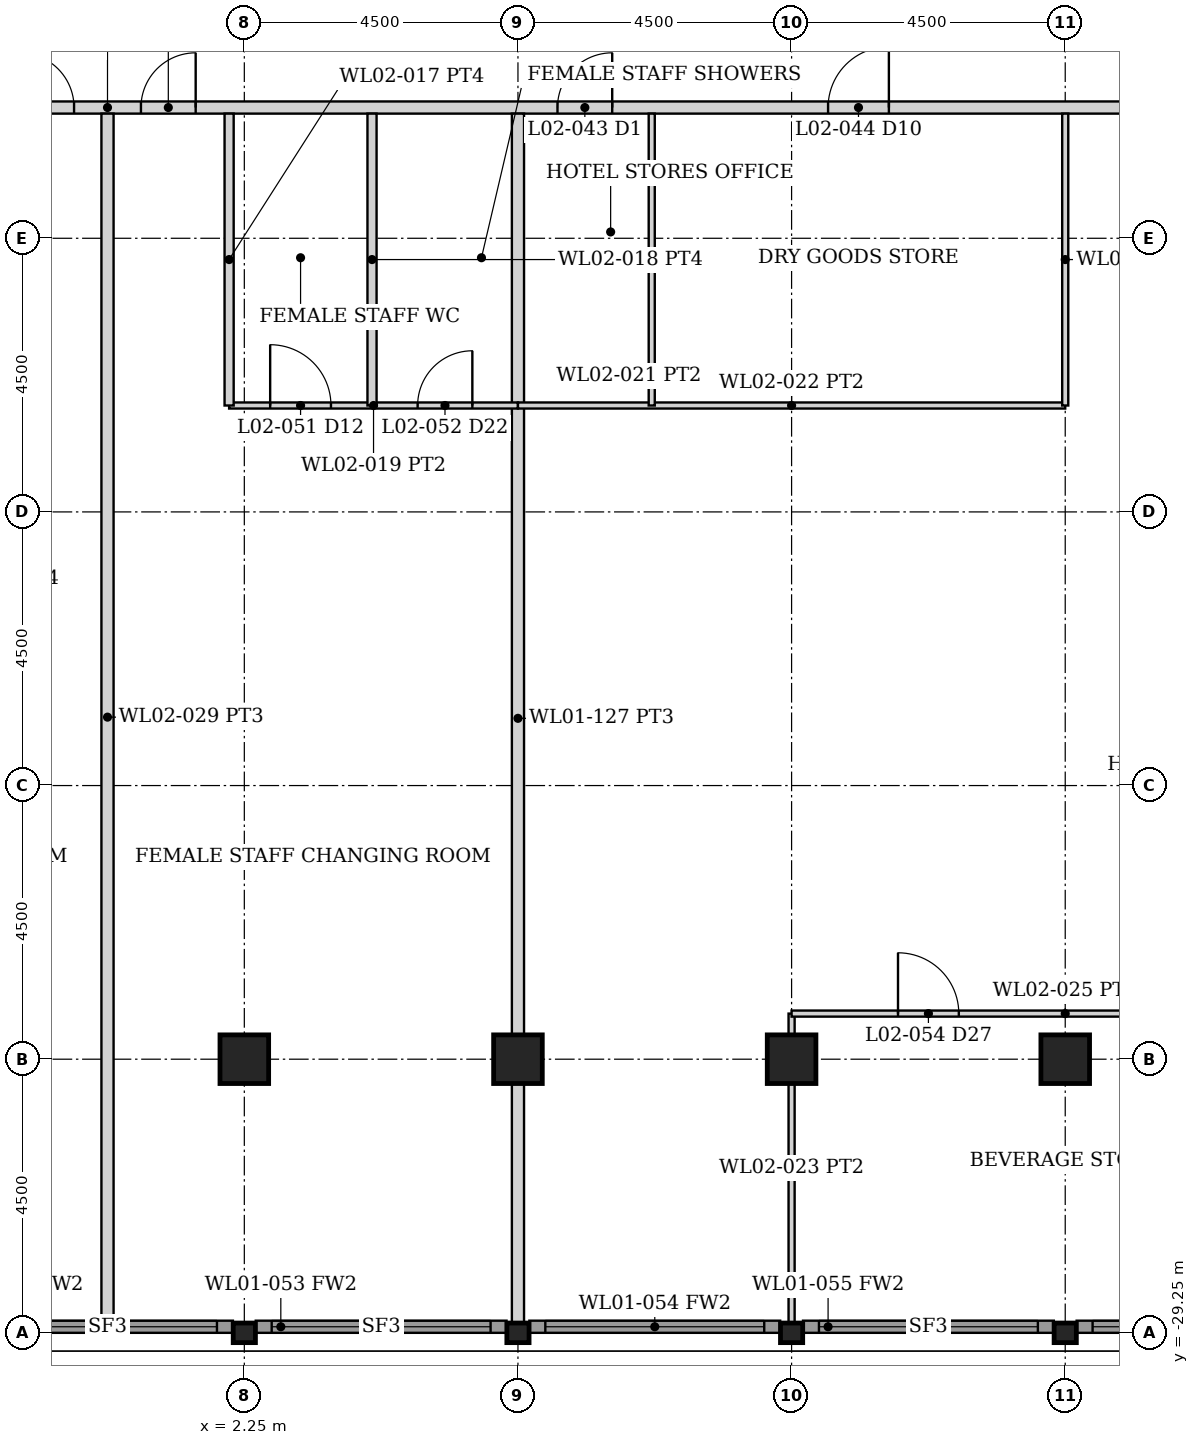
"""IFC4 building model, lengths in metres.
Left out: names, types, materials, properties, quantities, classifications, styles, units other than length and angle.
Written with IfcOpenShell. Run it as: python <this file> out.ifc"""

import sys

from ifc_helpers import new_model, si_unit, direction, frame, frame_2d, origin, origin_2d, place, context, subcontext, project, spatial, rectangle, hollow_rectangle, i_section, extrude, element, fill, save


model = new_model("IFC4")
c1 = context("Model", 3, precision=1e-05, world=origin(), true_north=direction((0.0, 1.0)))
c2 = subcontext(c1, "Body", "Model", "MODEL_VIEW")
j1 = project(units=[si_unit("LENGTHUNIT", "METRE"), si_unit("PLANEANGLEUNIT", "RADIAN")], contexts=[c1])
p1 = place(None, origin())
s1 = spatial("IfcSite", under=j1, at=p1, CompositionType="ELEMENT")
p2 = place(p1, origin())
s2 = spatial("IfcBuilding", under=s1, at=p2, CompositionType="ELEMENT")
p3 = place(p2, frame((0.0, 0.0, 11.0)))
s3 = spatial("IfcBuildingStorey", under=s2, at=p3, CompositionType="ELEMENT", Elevation=11.0)
for number, where, z_axis, x_axis in (
    (1, (2.25, -24.75, 0.0), (0.0, 0.0, 1.0), (0.0, 1.0, 0.0)),
    (2, (6.75, -24.75, 0.0), (0.0, 0.0, 1.0), (0.0, 1.0, 0.0)),
    (3, (11.25, -24.75, 0.0), (0.0, 0.0, 1.0), (0.0, 1.0, 0.0)),
    (4, (15.75, -24.75, 0.0), (0.0, 0.0, 1.0), (0.0, 1.0, 0.0)),
):
    element("IfcColumn", number, at=place(p3, frame(where, z_axis=z_axis, x_axis=x_axis)), inside=s3, PredefinedType="COLUMN", context=c2, shape_type="SweptSolid", body=[
        extrude(hollow_rectangle(XDim=0.8, YDim=0.8, WallThickness=0.08, at=origin_2d()), origin(), (0.0, 0.0, 1.0), 5.0),
    ])
for number, where, z_axis, x_axis in (
    (5, (2.25, -29.25, 0.0), (0.0, 0.0, 1.0), (0.0, 1.0, 0.0)),
    (6, (6.75, -29.25, 0.0), (0.0, 0.0, 1.0), (0.0, 1.0, 0.0)),
    (7, (11.25, -29.25, 0.0), (0.0, 0.0, 1.0), (0.0, 1.0, 0.0)),
    (8, (15.75, -29.25, 0.0), (0.0, 0.0, 1.0), (0.0, 1.0, 0.0)),
):
    element("IfcColumn", number, at=place(p3, frame(where, z_axis=z_axis, x_axis=x_axis)), inside=s3, PredefinedType="COLUMN", context=c2, shape_type="SweptSolid", body=[
        extrude(i_section(OverallWidth=0.322, OverallDepth=0.365, WebThickness=0.027, FlangeThickness=0.044, FilletRadius=0.015, at=origin_2d()), origin(), (0.0, 0.0, 1.0), 5.0),
    ])
p4 = place(p3, frame((-2.062, -29.15, 0.0), z_axis=(0.0, 0.0, 1.0), x_axis=(1.0, 0.0, 0.0)))
e9 = element("IfcWall", 9, at=p4, inside=s3, PredefinedType="SOLIDWALL", context=c2, shape_type="SweptSolid", body=[
    extrude(rectangle(XDim=4.125, YDim=0.2, at=frame_2d((2.062, 0.0))), origin(), (0.0, 0.0, 1.0), 4.133),
])
p5 = place(p4, frame((0.262, 0.0, 0.15)))
e10 = element("IfcOpeningElement", 10, at=p5, cuts=e9, PredefinedType="OPENING", context=c2, shape_type="SweptSolid", body=[
    extrude(rectangle(XDim=3.6, YDim=3.833, at=frame_2d((1.8, 1.917))), frame((0.0, 0.11, 0.0), z_axis=(0.0, -1.0, 0.0), x_axis=(1.0, 0.0, 0.0)), (0.0, 0.0, 1.0), 0.22),
])
p6 = place(p3, frame((2.438, -29.15, 0.0), z_axis=(0.0, 0.0, 1.0), x_axis=(1.0, 0.0, 0.0)))
e11 = element("IfcWall", 11, at=p6, inside=s3, PredefinedType="SOLIDWALL", context=c2, shape_type="SweptSolid", body=[
    extrude(rectangle(XDim=4.125, YDim=0.2, at=frame_2d((2.062, 0.0))), origin(), (0.0, 0.0, 1.0), 4.133),
])
p7 = place(p6, frame((0.262, 0.0, 0.15)))
e12 = element("IfcOpeningElement", 12, at=p7, cuts=e11, PredefinedType="OPENING", context=c2, shape_type="SweptSolid", body=[
    extrude(rectangle(XDim=3.6, YDim=3.833, at=frame_2d((1.8, 1.917))), frame((0.0, 0.11, 0.0), z_axis=(0.0, -1.0, 0.0), x_axis=(1.0, 0.0, 0.0)), (0.0, 0.0, 1.0), 0.22),
])
p8 = place(p3, frame((6.938, -29.15, 0.0), z_axis=(0.0, 0.0, 1.0), x_axis=(1.0, 0.0, 0.0)))
e13 = element("IfcWall", 13, at=p8, inside=s3, PredefinedType="SOLIDWALL", context=c2, shape_type="SweptSolid", body=[
    extrude(rectangle(XDim=4.125, YDim=0.2, at=frame_2d((2.062, 0.0))), origin(), (0.0, 0.0, 1.0), 4.133),
])
p9 = place(p8, frame((0.262, 0.0, 0.15)))
e14 = element("IfcOpeningElement", 14, at=p9, cuts=e13, PredefinedType="OPENING", context=c2, shape_type="SweptSolid", body=[
    extrude(rectangle(XDim=3.6, YDim=3.833, at=frame_2d((1.8, 1.917))), frame((0.0, 0.11, 0.0), z_axis=(0.0, -1.0, 0.0), x_axis=(1.0, 0.0, 0.0)), (0.0, 0.0, 1.0), 0.22),
])
p10 = place(p3, frame((11.438, -29.15, 0.0), z_axis=(0.0, 0.0, 1.0), x_axis=(1.0, 0.0, 0.0)))
e15 = element("IfcWall", 15, at=p10, inside=s3, PredefinedType="SOLIDWALL", context=c2, shape_type="SweptSolid", body=[
    extrude(rectangle(XDim=4.125, YDim=0.2, at=frame_2d((2.062, 0.0))), origin(), (0.0, 0.0, 1.0), 4.133),
])
p11 = place(p10, frame((0.262, 0.0, 0.15)))
e16 = element("IfcOpeningElement", 16, at=p11, cuts=e15, PredefinedType="OPENING", context=c2, shape_type="SweptSolid", body=[
    extrude(rectangle(XDim=3.6, YDim=3.833, at=frame_2d((1.8, 1.917))), frame((0.0, 0.11, 0.0), z_axis=(0.0, -1.0, 0.0), x_axis=(1.0, 0.0, 0.0)), (0.0, 0.0, 1.0), 0.22),
])
p12 = place(p3, frame((15.938, -29.15, 0.0), z_axis=(0.0, 0.0, 1.0), x_axis=(1.0, 0.0, 0.0)))
e17 = element("IfcWall", 17, at=p12, inside=s3, PredefinedType="SOLIDWALL", context=c2, shape_type="SweptSolid", body=[
    extrude(rectangle(XDim=4.125, YDim=0.2, at=frame_2d((2.062, 0.0))), origin(), (0.0, 0.0, 1.0), 4.133),
])
p13 = place(p12, frame((0.262, 0.0, 0.15)))
e18 = element("IfcOpeningElement", 18, at=p13, cuts=e17, PredefinedType="OPENING", context=c2, shape_type="SweptSolid", body=[
    extrude(rectangle(XDim=3.6, YDim=3.833, at=frame_2d((1.8, 1.917))), frame((0.0, 0.11, 0.0), z_axis=(0.0, -1.0, 0.0), x_axis=(1.0, 0.0, 0.0)), (0.0, 0.0, 1.0), 0.22),
])
p14 = place(p3, frame((-25.075, -9.1, 0.0), z_axis=(0.0, 0.0, 1.0), x_axis=(1.0, 0.0, 0.0)))
e19 = element("IfcWall", 19, at=p14, inside=s3, PredefinedType="PARTITIONING", context=c2, shape_type="SweptSolid", body=[
    extrude(rectangle(XDim=50.15, YDim=0.2, at=frame_2d((25.075, 0.0))), origin(), (0.0, 0.0, 1.0), 3.829),
])
p15 = place(p14, frame((6.85, 0.0, 0.0)))
e20 = element("IfcOpeningElement", 20, at=p15, cuts=e19, PredefinedType="OPENING", context=c2, shape_type="SweptSolid", body=[
    extrude(rectangle(XDim=0.9, YDim=2.1, at=frame_2d((0.45, 1.05))), frame((0.0, 0.11, 0.0), z_axis=(0.0, -1.0, 0.0), x_axis=(1.0, 0.0, 0.0)), (0.0, 0.0, 1.0), 0.22),
])
p16 = place(p14, frame((23.625, 0.0, 0.0)))
e21 = element("IfcOpeningElement", 21, at=p16, cuts=e19, PredefinedType="OPENING", context=c2, shape_type="SweptSolid", body=[
    extrude(rectangle(XDim=0.9, YDim=2.1, at=frame_2d((0.45, 1.05))), frame((0.0, 0.11, 0.0), z_axis=(0.0, -1.0, 0.0), x_axis=(1.0, 0.0, 0.0)), (0.0, 0.0, 1.0), 0.22),
])
p17 = place(p14, frame((25.625, 0.0, 0.0)))
e22 = element("IfcOpeningElement", 22, at=p17, cuts=e19, PredefinedType="OPENING", context=c2, shape_type="SweptSolid", body=[
    extrude(rectangle(XDim=0.9, YDim=2.1, at=frame_2d((0.45, 1.05))), frame((0.0, 0.11, 0.0), z_axis=(0.0, -1.0, 0.0), x_axis=(1.0, 0.0, 0.0)), (0.0, 0.0, 1.0), 0.22),
])
p18 = place(p14, frame((32.475, 0.0, 0.0)))
e23 = element("IfcOpeningElement", 23, at=p18, cuts=e19, PredefinedType="OPENING", context=c2, shape_type="SweptSolid", body=[
    extrude(rectangle(XDim=0.9, YDim=2.1, at=frame_2d((0.45, 1.05))), frame((0.0, 0.11, 0.0), z_axis=(0.0, -1.0, 0.0), x_axis=(1.0, 0.0, 0.0)), (0.0, 0.0, 1.0), 0.22),
])
p19 = place(p14, frame((36.925, 0.0, 0.0)))
e24 = element("IfcOpeningElement", 24, at=p19, cuts=e19, PredefinedType="OPENING", context=c2, shape_type="SweptSolid", body=[
    extrude(rectangle(XDim=1.0, YDim=2.1, at=frame_2d((0.5, 1.05))), frame((0.0, 0.11, 0.0), z_axis=(0.0, -1.0, 0.0), x_axis=(1.0, 0.0, 0.0)), (0.0, 0.0, 1.0), 0.22),
])
p20 = place(p14, frame((42.4, 0.0, 0.0)))
e25 = element("IfcOpeningElement", 25, at=p20, cuts=e19, PredefinedType="OPENING", context=c2, shape_type="SweptSolid", body=[
    extrude(rectangle(XDim=0.9, YDim=2.1, at=frame_2d((0.45, 1.05))), frame((0.0, 0.11, 0.0), z_axis=(0.0, -1.0, 0.0), x_axis=(1.0, 0.0, 0.0)), (0.0, 0.0, 1.0), 0.22),
])
p21 = place(p3, frame((0.0, -29.05, 0.0), z_axis=(0.0, 0.0, 1.0), x_axis=(0.0, 1.0, 0.0)))
e26 = element("IfcWall", 26, at=p21, inside=s3, PredefinedType="PARTITIONING", context=c2, shape_type="SweptSolid", body=[
    extrude(rectangle(XDim=19.85, YDim=0.2, at=frame_2d((9.925, 0.0))), origin(), (0.0, 0.0, 1.0), 3.829),
])
p22 = place(p3, frame((6.75, -29.089, 0.0), z_axis=(0.0, 0.0, 1.0), x_axis=(0.0, 1.0, 0.0)))
e27 = element("IfcWall", 27, at=p22, inside=s3, PredefinedType="PARTITIONING", context=c2, shape_type="SweptSolid", body=[
    extrude(rectangle(XDim=19.889, YDim=0.2, at=frame_2d((9.944, 0.0))), origin(), (0.0, 0.0, 1.0), 3.829),
])
p23 = place(p3, frame((2.0, -14.0, 0.0), z_axis=(0.0, 0.0, 1.0), x_axis=(1.0, 0.0, 0.0)))
e28 = element("IfcWall", 28, at=p23, inside=s3, PredefinedType="PARTITIONING", context=c2, shape_type="SweptSolid", body=[
    extrude(rectangle(XDim=4.75, YDim=0.1, at=frame_2d((2.375, 0.0))), origin(), (0.0, 0.0, 1.0), 3.829),
])
p24 = place(p23, frame((3.1, 0.0, 0.0)))
e29 = element("IfcOpeningElement", 29, at=p24, cuts=e28, PredefinedType="OPENING", context=c2, shape_type="SweptSolid", body=[
    extrude(rectangle(XDim=0.9, YDim=2.1, at=frame_2d((0.45, 1.05))), frame((0.0, 0.06, 0.0), z_axis=(0.0, -1.0, 0.0), x_axis=(1.0, 0.0, 0.0)), (0.0, 0.0, 1.0), 0.12),
])
p25 = place(p23, frame((0.675, 0.0, 0.0)))
e30 = element("IfcOpeningElement", 30, at=p25, cuts=e28, PredefinedType="OPENING", context=c2, shape_type="SweptSolid", body=[
    extrude(rectangle(XDim=1.0, YDim=2.1, at=frame_2d((0.5, 1.05))), frame((0.0, 0.06, 0.0), z_axis=(0.0, -1.0, 0.0), x_axis=(1.0, 0.0, 0.0)), (0.0, 0.0, 1.0), 0.12),
])
for number, where, z_axis, x_axis in (
    (31, (2.0, -14.0, 0.0), (0.0, 0.0, 1.0), (0.0, 1.0, 0.0)),
    (32, (4.35, -14.0, 0.0), (0.0, 0.0, 1.0), (0.0, 1.0, 0.0)),
):
    element("IfcWall", number, at=place(p3, frame(where, z_axis=z_axis, x_axis=x_axis)), inside=s3, PredefinedType="PARTITIONING", context=c2, shape_type="SweptSolid", body=[
        extrude(rectangle(XDim=4.8, YDim=0.15, at=frame_2d((2.4, 0.0))), origin(), (0.0, 0.0, 1.0), 3.829),
    ])
p26 = place(p3, frame((6.75, -14.0, 0.0), z_axis=(0.0, 0.0, 1.0), x_axis=(1.0, 0.0, 0.0)))
e33 = element("IfcWall", 33, at=p26, inside=s3, PredefinedType="PARTITIONING", context=c2, shape_type="SweptSolid", body=[
    extrude(rectangle(XDim=9.0, YDim=0.1, at=frame_2d((4.5, 0.0))), origin(), (0.0, 0.0, 1.0), 3.829),
])
for number, where, z_axis, x_axis in (
    (34, (8.95, -14.0, 0.0), (0.0, 0.0, 1.0), (0.0, 1.0, 0.0)),
    (35, (15.75, -14.0, 0.0), (0.0, 0.0, 1.0), (0.0, 1.0, 0.0)),
):
    element("IfcWall", number, at=place(p3, frame(where, z_axis=z_axis, x_axis=x_axis)), inside=s3, PredefinedType="PARTITIONING", context=c2, shape_type="SweptSolid", body=[
        extrude(rectangle(XDim=4.8, YDim=0.1, at=frame_2d((2.4, 0.0))), origin(), (0.0, 0.0, 1.0), 3.829),
    ])
p27 = place(p3, frame((11.25, -29.089, 0.0), z_axis=(0.0, 0.0, 1.0), x_axis=(0.0, 1.0, 0.0)))
e36 = element("IfcWall", 36, at=p27, inside=s3, PredefinedType="PARTITIONING", context=c2, shape_type="SweptSolid", body=[
    extrude(rectangle(XDim=5.089, YDim=0.1, at=frame_2d((2.544, 0.0))), origin(), (0.0, 0.0, 1.0), 3.829),
])
p28 = place(p3, frame((11.25, -24.0, 0.0), z_axis=(0.0, 0.0, 1.0), x_axis=(1.0, 0.0, 0.0)))
e37 = element("IfcWall", 37, at=p28, inside=s3, PredefinedType="PARTITIONING", context=c2, shape_type="SweptSolid", body=[
    extrude(rectangle(XDim=9.0, YDim=0.1, at=frame_2d((4.5, 0.0))), origin(), (0.0, 0.0, 1.0), 3.829),
])
p29 = place(p28, frame((1.75, 0.0, 0.0)))
e38 = element("IfcOpeningElement", 38, at=p29, cuts=e37, PredefinedType="OPENING", context=c2, shape_type="SweptSolid", body=[
    extrude(rectangle(XDim=1.0, YDim=2.1, at=frame_2d((0.5, 1.05))), frame((0.0, 0.06, 0.0), z_axis=(0.0, -1.0, 0.0), x_axis=(1.0, 0.0, 0.0)), (0.0, 0.0, 1.0), 0.12),
])
p30 = place(p5, origin())
e39 = element("IfcWindow", 39, at=p30, inside=s3, PartitioningType="SINGLE_PANEL", PredefinedType="WINDOW", context=c2, shape_type="SweptSolid", body=[
    extrude(rectangle(XDim=3.6, YDim=3.833, at=frame_2d((1.8, 1.917))), frame((0.0, 0.03, 0.0), z_axis=(0.0, -1.0, 0.0), x_axis=(1.0, 0.0, 0.0)), (0.0, 0.0, 1.0), 0.06),
])
fill(e10, e39)
p31 = place(p7, origin())
e40 = element("IfcWindow", 40, at=p31, inside=s3, PartitioningType="SINGLE_PANEL", PredefinedType="WINDOW", context=c2, shape_type="SweptSolid", body=[
    extrude(rectangle(XDim=3.6, YDim=3.833, at=frame_2d((1.8, 1.917))), frame((0.0, 0.03, 0.0), z_axis=(0.0, -1.0, 0.0), x_axis=(1.0, 0.0, 0.0)), (0.0, 0.0, 1.0), 0.06),
])
fill(e12, e40)
p32 = place(p9, origin())
e41 = element("IfcWindow", 41, at=p32, inside=s3, PartitioningType="SINGLE_PANEL", PredefinedType="WINDOW", context=c2, shape_type="SweptSolid", body=[
    extrude(rectangle(XDim=3.6, YDim=3.833, at=frame_2d((1.8, 1.917))), frame((0.0, 0.03, 0.0), z_axis=(0.0, -1.0, 0.0), x_axis=(1.0, 0.0, 0.0)), (0.0, 0.0, 1.0), 0.06),
])
fill(e14, e41)
p33 = place(p11, origin())
e42 = element("IfcWindow", 42, at=p33, inside=s3, PartitioningType="SINGLE_PANEL", PredefinedType="WINDOW", context=c2, shape_type="SweptSolid", body=[
    extrude(rectangle(XDim=3.6, YDim=3.833, at=frame_2d((1.8, 1.917))), frame((0.0, 0.03, 0.0), z_axis=(0.0, -1.0, 0.0), x_axis=(1.0, 0.0, 0.0)), (0.0, 0.0, 1.0), 0.06),
])
fill(e16, e42)
p34 = place(p13, origin())
e43 = element("IfcWindow", 43, at=p34, inside=s3, PartitioningType="SINGLE_PANEL", PredefinedType="WINDOW", context=c2, shape_type="SweptSolid", body=[
    extrude(rectangle(XDim=3.6, YDim=3.833, at=frame_2d((1.8, 1.917))), frame((0.0, 0.03, 0.0), z_axis=(0.0, -1.0, 0.0), x_axis=(1.0, 0.0, 0.0)), (0.0, 0.0, 1.0), 0.06),
])
fill(e18, e43)
p35 = place(p16, origin())
e44 = element("IfcDoor", 44, at=p35, inside=s3, OperationType="SINGLE_SWING_LEFT", PredefinedType="DOOR", context=c2, shape_type="SweptSolid", body=[
    extrude(rectangle(XDim=0.9, YDim=2.1, at=frame_2d((0.45, 1.05))), frame((0.0, 0.025, 0.0), z_axis=(0.0, -1.0, 0.0), x_axis=(1.0, 0.0, 0.0)), (0.0, 0.0, 1.0), 0.05),
])
fill(e21, e44)
p36 = place(p24, origin())
e45 = element("IfcDoor", 45, at=p36, inside=s3, OperationType="SINGLE_SWING_RIGHT", PredefinedType="DOOR", context=c2, shape_type="SweptSolid", body=[
    extrude(rectangle(XDim=0.9, YDim=2.1, at=frame_2d((0.45, 1.05))), frame((0.0, 0.025, 0.0), z_axis=(0.0, -1.0, 0.0), x_axis=(1.0, 0.0, 0.0)), (0.0, 0.0, 1.0), 0.05),
])
fill(e29, e45)
p37 = place(p25, origin())
e46 = element("IfcDoor", 46, at=p37, inside=s3, OperationType="SINGLE_SWING_LEFT", PredefinedType="DOOR", context=c2, shape_type="SweptSolid", body=[
    extrude(rectangle(XDim=1.0, YDim=2.1, at=frame_2d((0.5, 1.05))), frame((0.0, 0.025, 0.0), z_axis=(0.0, -1.0, 0.0), x_axis=(1.0, 0.0, 0.0)), (0.0, 0.0, 1.0), 0.05),
])
fill(e30, e46)
p38 = place(p17, origin())
e47 = element("IfcDoor", 47, at=p38, inside=s3, OperationType="SINGLE_SWING_RIGHT", PredefinedType="DOOR", context=c2, shape_type="SweptSolid", body=[
    extrude(rectangle(XDim=0.9, YDim=2.1, at=frame_2d((0.45, 1.05))), frame((0.0, 0.025, 0.0), z_axis=(0.0, -1.0, 0.0), x_axis=(1.0, 0.0, 0.0)), (0.0, 0.0, 1.0), 0.05),
])
fill(e22, e47)
p39 = place(p18, origin())
e48 = element("IfcDoor", 48, at=p39, inside=s3, OperationType="SINGLE_SWING_RIGHT", PredefinedType="DOOR", context=c2, shape_type="SweptSolid", body=[
    extrude(rectangle(XDim=0.9, YDim=2.1, at=frame_2d((0.45, 1.05))), frame((0.0, 0.025, 0.0), z_axis=(0.0, -1.0, 0.0), x_axis=(1.0, 0.0, 0.0)), (0.0, 0.0, 1.0), 0.05),
])
fill(e23, e48)
p40 = place(p19, origin())
e49 = element("IfcDoor", 49, at=p40, inside=s3, OperationType="SINGLE_SWING_RIGHT", PredefinedType="DOOR", context=c2, shape_type="SweptSolid", body=[
    extrude(rectangle(XDim=1.0, YDim=2.1, at=frame_2d((0.5, 1.05))), frame((0.0, 0.025, 0.0), z_axis=(0.0, -1.0, 0.0), x_axis=(1.0, 0.0, 0.0)), (0.0, 0.0, 1.0), 0.05),
])
fill(e24, e49)
p41 = place(p29, origin())
e50 = element("IfcDoor", 50, at=p41, inside=s3, OperationType="SINGLE_SWING_LEFT", PredefinedType="DOOR", context=c2, shape_type="SweptSolid", body=[
    extrude(rectangle(XDim=1.0, YDim=2.1, at=frame_2d((0.5, 1.05))), frame((0.0, 0.025, 0.0), z_axis=(0.0, -1.0, 0.0), x_axis=(1.0, 0.0, 0.0)), (0.0, 0.0, 1.0), 0.05),
])
fill(e38, e50)
save(model, sys.argv[1])
